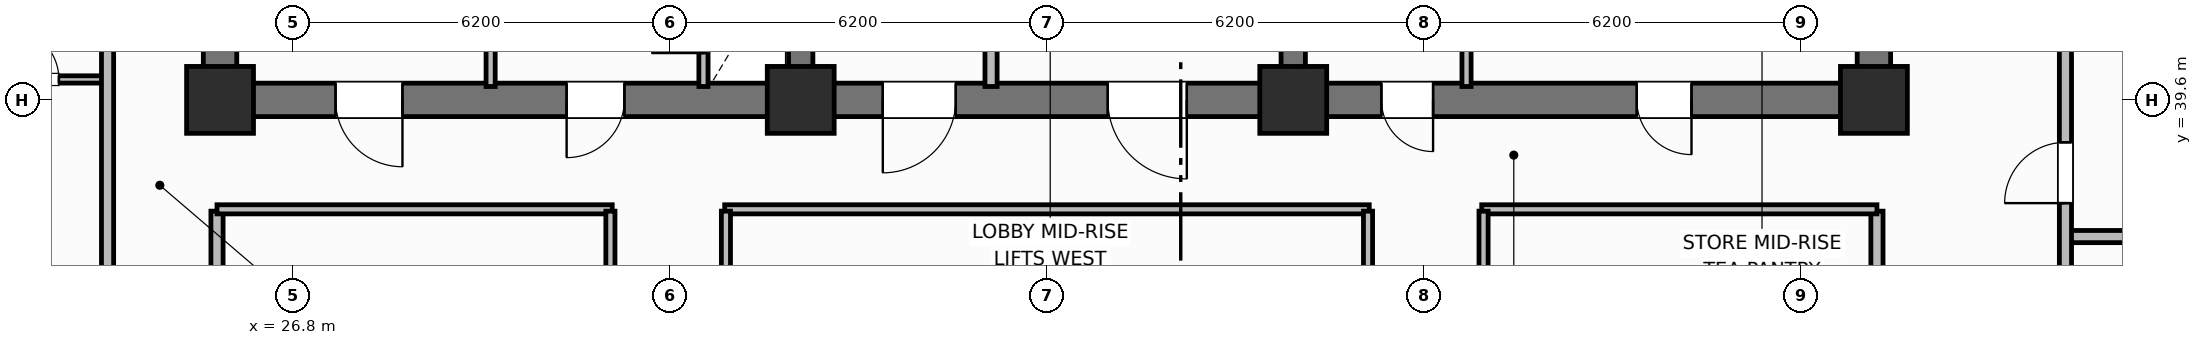
"""IFC4 building model, lengths in metres.
Left out: names, types, materials, properties, quantities, classifications, styles, units other than length and angle.
Written with IfcOpenShell. Run it as: python <this file> out.ifc"""

import sys

from ifc_helpers import new_model, si_unit, direction, frame, frame_2d, origin, origin_2d, place, context, subcontext, project, spatial, rectangle, extrude, element, fill, save


model = new_model("IFC4")
c1 = context("Model", 3, precision=1e-05, world=origin(), true_north=direction((0.0, 1.0)))
c2 = subcontext(c1, "Body", "Model", "MODEL_VIEW")
j1 = project(units=[si_unit("LENGTHUNIT", "METRE"), si_unit("PLANEANGLEUNIT", "RADIAN")], contexts=[c1])
p1 = place(None, origin())
s1 = spatial("IfcSite", under=j1, at=p1, CompositionType="ELEMENT")
p2 = place(p1, origin())
s2 = spatial("IfcBuilding", under=s1, at=p2, CompositionType="ELEMENT")
p3 = place(p2, frame((0.0, 0.0, 114.2)))
s3 = spatial("IfcBuildingStorey", under=s2, at=p3, CompositionType="ELEMENT", Elevation=114.2)
for number, where, z_axis, x_axis in (
    (1, (25.6, 39.875, 0.0), (0.0, 0.0, 1.0), (0.0, 1.0, 0.0)),
    (2, (52.8, 39.875, 0.0), (0.0, 0.0, 1.0), (0.0, 1.0, 0.0)),
):
    element("IfcWall", number, at=place(p3, frame(where, z_axis=z_axis, x_axis=x_axis)), inside=s3, PredefinedType="SHEAR", context=c2, shape_type="SweptSolid", body=[
        extrude(rectangle(XDim=5.65, YDim=0.55, at=frame_2d((2.825, 0.0))), origin(), (0.0, 0.0, 1.0), 3.7),
    ])
p4 = place(p3, frame((52.8, 39.6, 0.0), z_axis=(0.0, 0.0, 1.0), x_axis=(-1.0, 0.0, 0.0)))
e3 = element("IfcWall", 3, at=p4, inside=s3, PredefinedType="SHEAR", context=c2, shape_type="SweptSolid", body=[
    extrude(rectangle(XDim=27.2, YDim=0.55, at=frame_2d((13.6, 0.0))), origin(), (0.0, 0.0, 1.0), 3.7),
])
p5 = place(p4, frame((24.2, 0.0, 0.0)))
e4 = element("IfcOpeningElement", 4, at=p5, cuts=e3, PredefinedType="OPENING", context=c2, shape_type="SweptSolid", body=[
    extrude(rectangle(XDim=1.1, YDim=2.15, at=frame_2d((0.55, 1.075))), frame((0.0, 0.285, 0.0), z_axis=(0.0, -1.0, 0.0), x_axis=(1.0, 0.0, 0.0)), (0.0, 0.0, 1.0), 0.57),
])
p6 = place(p4, frame((20.55, 0.0, 0.0)))
e5 = element("IfcOpeningElement", 5, at=p6, cuts=e3, PredefinedType="OPENING", context=c2, shape_type="SweptSolid", body=[
    extrude(rectangle(XDim=0.95, YDim=2.1, at=frame_2d((0.475, 1.05))), frame((0.0, 0.285, 0.0), z_axis=(0.0, -1.0, 0.0), x_axis=(1.0, 0.0, 0.0)), (0.0, 0.0, 1.0), 0.57),
])
p7 = place(p4, frame((15.1, 0.0, 0.0)))
e6 = element("IfcOpeningElement", 6, at=p7, cuts=e3, PredefinedType="OPENING", context=c2, shape_type="SweptSolid", body=[
    extrude(rectangle(XDim=1.2, YDim=2.15, at=frame_2d((0.6, 1.075))), frame((0.0, 0.285, 0.0), z_axis=(0.0, -1.0, 0.0), x_axis=(1.0, 0.0, 0.0)), (0.0, 0.0, 1.0), 0.57),
])
p8 = place(p4, frame((11.3, 0.0, 0.0)))
e7 = element("IfcOpeningElement", 7, at=p8, cuts=e3, PredefinedType="OPENING", context=c2, shape_type="SweptSolid", body=[
    extrude(rectangle(XDim=1.3, YDim=2.2, at=frame_2d((0.65, 1.1))), frame((0.0, 0.285, 0.0), z_axis=(0.0, -1.0, 0.0), x_axis=(1.0, 0.0, 0.0)), (0.0, 0.0, 1.0), 0.57),
])
p9 = place(p4, frame((7.25, 0.0, 0.0)))
e8 = element("IfcOpeningElement", 8, at=p9, cuts=e3, PredefinedType="OPENING", context=c2, shape_type="SweptSolid", body=[
    extrude(rectangle(XDim=0.85, YDim=2.1, at=frame_2d((0.425, 1.05))), frame((0.0, 0.285, 0.0), z_axis=(0.0, -1.0, 0.0), x_axis=(1.0, 0.0, 0.0)), (0.0, 0.0, 1.0), 0.57),
])
p10 = place(p4, frame((3.0, 0.0, 0.0)))
e9 = element("IfcOpeningElement", 9, at=p10, cuts=e3, PredefinedType="OPENING", context=c2, shape_type="SweptSolid", body=[
    extrude(rectangle(XDim=0.9, YDim=2.1, at=frame_2d((0.45, 1.05))), frame((0.0, 0.285, 0.0), z_axis=(0.0, -1.0, 0.0), x_axis=(1.0, 0.0, 0.0)), (0.0, 0.0, 1.0), 0.57),
])
for number, where, z_axis, x_axis in (
    (10, (35.15, 39.875, 0.0), (0.0, 0.0, 1.0), (0.0, 1.0, 0.0)),
    (11, (43.25, 39.875, 0.0), (0.0, 0.0, 1.0), (0.0, 1.0, 0.0)),
):
    element("IfcWall", number, at=place(p3, frame(where, z_axis=z_axis, x_axis=x_axis)), inside=s3, PredefinedType="SHEAR", context=c2, shape_type="SweptSolid", body=[
        extrude(rectangle(XDim=5.65, YDim=0.4, at=frame_2d((2.825, 0.0))), origin(), (0.0, 0.0, 1.0), 3.7),
    ])
for number, where, z_axis, x_axis in (
    (12, (25.6, 39.6, 0.0), (0.0, 0.0, 1.0), (1.0, 0.0, 0.0)),
    (13, (35.15, 39.6, 0.0), (0.0, 0.0, 1.0), (1.0, 0.0, 0.0)),
    (14, (43.25, 39.6, 0.0), (0.0, 0.0, 1.0), (1.0, 0.0, 0.0)),
    (15, (52.8, 39.6, 0.0), (0.0, 0.0, 1.0), (1.0, 0.0, 0.0)),
):
    element("IfcColumn", number, at=place(p3, frame(where, z_axis=z_axis, x_axis=x_axis)), inside=s3, PredefinedType="COLUMN", context=c2, shape_type="SweptSolid", body=[
        extrude(rectangle(XDim=1.1, YDim=1.1, at=origin_2d()), origin(), (0.0, 0.0, 1.0), 3.7),
    ])
p11 = place(p3, frame((33.55, 39.82, 0.0), z_axis=(0.0, 0.0, 1.0), x_axis=(0.0, 1.0, 0.0)))
e16 = element("IfcWall", 16, at=p11, inside=s3, PredefinedType="PARTITIONING", context=c2, shape_type="SweptSolid", body=[
    extrude(rectangle(XDim=2.13, YDim=0.15, at=frame_2d((1.065, 0.0))), origin(), (0.0, 0.0, 1.0), 2.53),
])
p12 = place(p11, frame((0.55, 0.0, 0.0)))
e17 = element("IfcOpeningElement", 17, at=p12, cuts=e16, PredefinedType="OPENING", context=c2, shape_type="SweptSolid", body=[
    extrude(rectangle(XDim=0.85, YDim=2.05, at=frame_2d((0.425, 1.025))), frame((0.0, 0.085, 0.0), z_axis=(0.0, -1.0, 0.0), x_axis=(1.0, 0.0, 0.0)), (0.0, 0.0, 1.0), 0.17),
])
p13 = place(p3, frame((30.05, 39.82, 0.0), z_axis=(0.0, 0.0, 1.0), x_axis=(0.0, 1.0, 0.0)))
e18 = element("IfcWall", 18, at=p13, inside=s3, PredefinedType="PARTITIONING", context=c2, shape_type="SweptSolid", body=[
    extrude(rectangle(XDim=2.13, YDim=0.15, at=frame_2d((1.065, 0.0))), origin(), (0.0, 0.0, 1.0), 2.53),
])
p14 = place(p3, frame((38.28, 39.82, 0.0), z_axis=(0.0, 0.0, 1.0), x_axis=(0.0, 1.0, 0.0)))
e19 = element("IfcWall", 19, at=p14, inside=s3, PredefinedType="PARTITIONING", context=c2, shape_type="SweptSolid", body=[
    extrude(rectangle(XDim=2.73, YDim=0.2, at=frame_2d((1.365, 0.0))), origin(), (0.0, 0.0, 1.0), 2.53),
])
p15 = place(p3, frame((46.1, 39.82, 0.0), z_axis=(0.0, 0.0, 1.0), x_axis=(0.0, 1.0, 0.0)))
e20 = element("IfcWall", 20, at=p15, inside=s3, PredefinedType="PARTITIONING", context=c2, shape_type="SweptSolid", body=[
    extrude(rectangle(XDim=2.73, YDim=0.15, at=frame_2d((1.365, 0.0))), origin(), (0.0, 0.0, 1.0), 2.53),
])
for number, where, z_axis, x_axis in (
    (21, (25.55, 18.63, 0.0), (0.0, 0.0, 1.0), (0.0, 1.0, 0.0)),
    (22, (52.85, 18.63, 0.0), (0.0, 0.0, 1.0), (0.0, 1.0, 0.0)),
):
    element("IfcWall", number, at=place(p3, frame(where, z_axis=z_axis, x_axis=x_axis)), inside=s3, PredefinedType="PARTITIONING", context=c2, shape_type="SweptSolid", body=[
        extrude(rectangle(XDim=19.14, YDim=0.2, at=frame_2d((9.57, 0.0))), origin(), (0.0, 0.0, 1.0), 2.53),
    ])
p16 = place(p3, frame((25.55, 37.8, 0.0), z_axis=(0.0, 0.0, 1.0), x_axis=(1.0, 0.0, 0.0)))
e23 = element("IfcWall", 23, at=p16, inside=s3, PredefinedType="PARTITIONING", context=c2, shape_type="SweptSolid", body=[
    extrude(rectangle(XDim=6.5, YDim=0.15, at=frame_2d((3.25, 0.0))), origin(), (0.0, 0.0, 1.0), 2.53),
])
p17 = place(p3, frame((33.9, 37.8, 0.0), z_axis=(0.0, 0.0, 1.0), x_axis=(1.0, 0.0, 0.0)))
e24 = element("IfcWall", 24, at=p17, inside=s3, PredefinedType="PARTITIONING", context=c2, shape_type="SweptSolid", body=[
    extrude(rectangle(XDim=10.6, YDim=0.15, at=frame_2d((5.3, 0.0))), origin(), (0.0, 0.0, 1.0), 2.53),
])
p18 = place(p3, frame((46.35, 37.8, 0.0), z_axis=(0.0, 0.0, 1.0), x_axis=(1.0, 0.0, 0.0)))
e25 = element("IfcWall", 25, at=p18, inside=s3, PredefinedType="PARTITIONING", context=c2, shape_type="SweptSolid", body=[
    extrude(rectangle(XDim=6.5, YDim=0.15, at=frame_2d((3.25, 0.0))), origin(), (0.0, 0.0, 1.0), 2.53),
])
p19 = place(p3, frame((32.02, 18.63, 0.0), z_axis=(0.0, 0.0, 1.0), x_axis=(0.0, 1.0, 0.0)))
e26 = element("IfcWall", 26, at=p19, inside=s3, PredefinedType="PARTITIONING", context=c2, shape_type="SweptSolid", body=[
    extrude(rectangle(XDim=19.14, YDim=0.15, at=frame_2d((9.57, 0.0))), origin(), (0.0, 0.0, 1.0), 2.53),
])
p20 = place(p19, frame((5.5, 0.0, 0.0)))
e27 = element("IfcOpeningElement", 27, at=p20, cuts=e26, PredefinedType="OPENING", context=c2, shape_type="SweptSolid", body=[
    extrude(rectangle(XDim=1.0, YDim=2.15, at=frame_2d((0.5, 1.075))), frame((0.0, 0.085, 0.0), z_axis=(0.0, -1.0, 0.0), x_axis=(1.0, 0.0, 0.0)), (0.0, 0.0, 1.0), 0.17),
])
p21 = place(p3, frame((33.92, 18.63, 0.0), z_axis=(0.0, 0.0, 1.0), x_axis=(0.0, 1.0, 0.0)))
e28 = element("IfcWall", 28, at=p21, inside=s3, PredefinedType="PARTITIONING", context=c2, shape_type="SweptSolid", body=[
    extrude(rectangle(XDim=19.14, YDim=0.15, at=frame_2d((9.57, 0.0))), origin(), (0.0, 0.0, 1.0), 2.53),
])
p22 = place(p21, frame((2.4, 0.0, 0.0)))
e29 = element("IfcOpeningElement", 29, at=p22, cuts=e28, PredefinedType="OPENING", context=c2, shape_type="SweptSolid", body=[
    extrude(rectangle(XDim=1.0, YDim=2.15, at=frame_2d((0.5, 1.075))), frame((0.0, 0.085, 0.0), z_axis=(0.0, -1.0, 0.0), x_axis=(1.0, 0.0, 0.0)), (0.0, 0.0, 1.0), 0.17),
])
p23 = place(p3, frame((44.48, 18.63, 0.0), z_axis=(0.0, 0.0, 1.0), x_axis=(0.0, 1.0, 0.0)))
e30 = element("IfcWall", 30, at=p23, inside=s3, PredefinedType="PARTITIONING", context=c2, shape_type="SweptSolid", body=[
    extrude(rectangle(XDim=19.14, YDim=0.15, at=frame_2d((9.57, 0.0))), origin(), (0.0, 0.0, 1.0), 2.53),
])
p24 = place(p23, frame((10.804, 0.0, 0.0)))
e31 = element("IfcOpeningElement", 31, at=p24, cuts=e30, PredefinedType="OPENING", context=c2, shape_type="SweptSolid", body=[
    extrude(rectangle(XDim=1.0, YDim=2.15, at=frame_2d((0.5, 1.075))), frame((0.0, 0.085, 0.0), z_axis=(0.0, -1.0, 0.0), x_axis=(1.0, 0.0, 0.0)), (0.0, 0.0, 1.0), 0.17),
])
p25 = place(p3, frame((46.38, 18.63, 0.0), z_axis=(0.0, 0.0, 1.0), x_axis=(0.0, 1.0, 0.0)))
e32 = element("IfcWall", 32, at=p25, inside=s3, PredefinedType="PARTITIONING", context=c2, shape_type="SweptSolid", body=[
    extrude(rectangle(XDim=19.14, YDim=0.15, at=frame_2d((9.57, 0.0))), origin(), (0.0, 0.0, 1.0), 2.53),
])
p26 = place(p25, frame((5.5, 0.0, 0.0)))
e33 = element("IfcOpeningElement", 33, at=p26, cuts=e32, PredefinedType="OPENING", context=c2, shape_type="SweptSolid", body=[
    extrude(rectangle(XDim=1.0, YDim=2.15, at=frame_2d((0.5, 1.075))), frame((0.0, 0.085, 0.0), z_axis=(0.0, -1.0, 0.0), x_axis=(1.0, 0.0, 0.0)), (0.0, 0.0, 1.0), 0.17),
])
p27 = place(p3, frame((21.5, 39.936, 0.0), z_axis=(0.0, 0.0, 1.0), x_axis=(1.0, 0.0, 0.0)))
e34 = element("IfcWall", 34, at=p27, inside=s3, PredefinedType="PARTITIONING", context=c2, shape_type="SweptSolid", body=[
    extrude(rectangle(XDim=2.25, YDim=0.12, at=frame_2d((1.125, 0.0))), origin(), (0.0, 0.0, 1.0), 2.53),
])
p28 = place(p27, frame((0.6, 0.0, 0.0)))
e35 = element("IfcOpeningElement", 35, at=p28, cuts=e34, PredefinedType="OPENING", context=c2, shape_type="SweptSolid", body=[
    extrude(rectangle(XDim=0.85, YDim=2.1, at=frame_2d((0.425, 1.05))), frame((0.0, 0.07, 0.0), z_axis=(0.0, -1.0, 0.0), x_axis=(1.0, 0.0, 0.0)), (0.0, 0.0, 1.0), 0.14),
])
p29 = place(p3, frame((23.75, 10.6, 0.0), z_axis=(0.0, 0.0, 1.0), x_axis=(0.0, 1.0, 0.0)))
e36 = element("IfcWall", 36, at=p29, inside=s3, PredefinedType="PARTITIONING", context=c2, shape_type="SweptSolid", body=[
    extrude(rectangle(XDim=35.2, YDim=0.2, at=frame_2d((17.6, 0.0))), origin(), (0.0, 0.0, 1.0), 2.53),
])
p30 = place(p29, frame((2.65, 0.0, 0.0)))
e37 = element("IfcOpeningElement", 37, at=p30, cuts=e36, PredefinedType="OPENING", context=c2, shape_type="SweptSolid", body=[
    extrude(rectangle(XDim=1.0, YDim=2.15, at=frame_2d((0.5, 1.075))), frame((0.0, 0.11, 0.0), z_axis=(0.0, -1.0, 0.0), x_axis=(1.0, 0.0, 0.0)), (0.0, 0.0, 1.0), 0.22),
])
p31 = place(p29, frame((12.87, 0.0, 0.0)))
e38 = element("IfcOpeningElement", 38, at=p31, cuts=e36, PredefinedType="OPENING", context=c2, shape_type="SweptSolid", body=[
    extrude(rectangle(XDim=1.0, YDim=2.15, at=frame_2d((0.5, 1.075))), frame((0.0, 0.11, 0.0), z_axis=(0.0, -1.0, 0.0), x_axis=(1.0, 0.0, 0.0)), (0.0, 0.0, 1.0), 0.22),
])
p32 = place(p29, frame((24.486, 0.0, 0.0)))
e39 = element("IfcOpeningElement", 39, at=p32, cuts=e36, PredefinedType="OPENING", context=c2, shape_type="SweptSolid", body=[
    extrude(rectangle(XDim=1.0, YDim=2.15, at=frame_2d((0.5, 1.075))), frame((0.0, 0.11, 0.0), z_axis=(0.0, -1.0, 0.0), x_axis=(1.0, 0.0, 0.0)), (0.0, 0.0, 1.0), 0.22),
])
p33 = place(p3, frame((55.95, 37.352, 0.0), z_axis=(0.0, 0.0, 1.0), x_axis=(1.0, 0.0, 0.0)))
e40 = element("IfcWall", 40, at=p33, inside=s3, PredefinedType="PARTITIONING", context=c2, shape_type="SweptSolid", body=[
    extrude(rectangle(XDim=7.88, YDim=0.2, at=frame_2d((3.94, 0.0))), origin(), (0.0, 0.0, 1.0), 2.53),
])
p34 = place(p3, frame((55.95, 10.6, 0.0), z_axis=(0.0, 0.0, 1.0), x_axis=(0.0, 1.0, 0.0)))
e41 = element("IfcWall", 41, at=p34, inside=s3, PredefinedType="PARTITIONING", context=c2, shape_type="SweptSolid", body=[
    extrude(rectangle(XDim=35.2, YDim=0.2, at=frame_2d((17.6, 0.0))), origin(), (0.0, 0.0, 1.0), 2.53),
])
p35 = place(p34, frame((2.65, 0.0, 0.0)))
e42 = element("IfcOpeningElement", 42, at=p35, cuts=e41, PredefinedType="OPENING", context=c2, shape_type="SweptSolid", body=[
    extrude(rectangle(XDim=1.0, YDim=2.15, at=frame_2d((0.5, 1.075))), frame((0.0, 0.11, 0.0), z_axis=(0.0, -1.0, 0.0), x_axis=(1.0, 0.0, 0.0)), (0.0, 0.0, 1.0), 0.22),
])
p36 = place(p34, frame((11.352, 0.0, 0.0)))
e43 = element("IfcOpeningElement", 43, at=p36, cuts=e41, PredefinedType="OPENING", context=c2, shape_type="SweptSolid", body=[
    extrude(rectangle(XDim=1.0, YDim=2.15, at=frame_2d((0.5, 1.075))), frame((0.0, 0.11, 0.0), z_axis=(0.0, -1.0, 0.0), x_axis=(1.0, 0.0, 0.0)), (0.0, 0.0, 1.0), 0.22),
])
p37 = place(p34, frame((21.37, 0.0, 0.0)))
e44 = element("IfcOpeningElement", 44, at=p37, cuts=e41, PredefinedType="OPENING", context=c2, shape_type="SweptSolid", body=[
    extrude(rectangle(XDim=1.0, YDim=2.15, at=frame_2d((0.5, 1.075))), frame((0.0, 0.11, 0.0), z_axis=(0.0, -1.0, 0.0), x_axis=(1.0, 0.0, 0.0)), (0.0, 0.0, 1.0), 0.22),
])
p38 = place(p34, frame((27.302, 0.0, 0.0)))
e45 = element("IfcOpeningElement", 45, at=p38, cuts=e41, PredefinedType="OPENING", context=c2, shape_type="SweptSolid", body=[
    extrude(rectangle(XDim=1.0, YDim=2.15, at=frame_2d((0.5, 1.075))), frame((0.0, 0.11, 0.0), z_axis=(0.0, -1.0, 0.0), x_axis=(1.0, 0.0, 0.0)), (0.0, 0.0, 1.0), 0.22),
])
p39 = place(p12, origin())
e46 = element("IfcDoor", 46, at=p39, inside=s3, OperationType="SINGLE_SWING_LEFT", PredefinedType="TRAPDOOR", context=c2, shape_type="SweptSolid", body=[
    extrude(rectangle(XDim=0.85, YDim=2.05, at=frame_2d((0.425, 1.025))), frame((0.0, 0.025, 0.0), z_axis=(0.0, -1.0, 0.0), x_axis=(1.0, 0.0, 0.0)), (0.0, 0.0, 1.0), 0.05),
])
fill(e17, e46)
p40 = place(p28, origin())
e47 = element("IfcDoor", 47, at=p40, inside=s3, OperationType="SINGLE_SWING_LEFT", PredefinedType="DOOR", context=c2, shape_type="SweptSolid", body=[
    extrude(rectangle(XDim=0.85, YDim=2.1, at=frame_2d((0.425, 1.05))), frame((0.0, 0.025, 0.0), z_axis=(0.0, -1.0, 0.0), x_axis=(1.0, 0.0, 0.0)), (0.0, 0.0, 1.0), 0.05),
])
fill(e35, e47)
p41 = place(p38, origin())
e48 = element("IfcDoor", 48, at=p41, inside=s3, OperationType="SINGLE_SWING_LEFT", PredefinedType="DOOR", context=c2, shape_type="SweptSolid", body=[
    extrude(rectangle(XDim=1.0, YDim=2.15, at=frame_2d((0.5, 1.075))), frame((0.0, 0.025, 0.0), z_axis=(0.0, -1.0, 0.0), x_axis=(1.0, 0.0, 0.0)), (0.0, 0.0, 1.0), 0.05),
])
fill(e45, e48)
p42 = place(p5, origin())
e49 = element("IfcDoor", 49, at=p42, inside=s3, OperationType="SINGLE_SWING_LEFT", PredefinedType="DOOR", context=c2, shape_type="SweptSolid", body=[
    extrude(rectangle(XDim=1.1, YDim=2.15, at=frame_2d((0.55, 1.075))), frame((0.0, 0.025, 0.0), z_axis=(0.0, -1.0, 0.0), x_axis=(1.0, 0.0, 0.0)), (0.0, 0.0, 1.0), 0.05),
])
fill(e4, e49)
p43 = place(p6, origin())
e50 = element("IfcDoor", 50, at=p43, inside=s3, OperationType="SINGLE_SWING_RIGHT", PredefinedType="DOOR", context=c2, shape_type="SweptSolid", body=[
    extrude(rectangle(XDim=0.95, YDim=2.1, at=frame_2d((0.475, 1.05))), frame((0.0, 0.025, 0.0), z_axis=(0.0, -1.0, 0.0), x_axis=(1.0, 0.0, 0.0)), (0.0, 0.0, 1.0), 0.05),
])
fill(e5, e50)
p44 = place(p7, origin())
e51 = element("IfcDoor", 51, at=p44, inside=s3, OperationType="SINGLE_SWING_RIGHT", PredefinedType="DOOR", context=c2, shape_type="SweptSolid", body=[
    extrude(rectangle(XDim=1.2, YDim=2.15, at=frame_2d((0.6, 1.075))), frame((0.0, 0.025, 0.0), z_axis=(0.0, -1.0, 0.0), x_axis=(1.0, 0.0, 0.0)), (0.0, 0.0, 1.0), 0.05),
])
fill(e6, e51)
p45 = place(p8, origin())
e52 = element("IfcDoor", 52, at=p45, inside=s3, OperationType="SINGLE_SWING_LEFT", PredefinedType="DOOR", context=c2, shape_type="SweptSolid", body=[
    extrude(rectangle(XDim=1.3, YDim=2.2, at=frame_2d((0.65, 1.1))), frame((0.0, 0.025, 0.0), z_axis=(0.0, -1.0, 0.0), x_axis=(1.0, 0.0, 0.0)), (0.0, 0.0, 1.0), 0.05),
])
fill(e7, e52)
p46 = place(p9, origin())
e53 = element("IfcDoor", 53, at=p46, inside=s3, OperationType="SINGLE_SWING_LEFT", PredefinedType="DOOR", context=c2, shape_type="SweptSolid", body=[
    extrude(rectangle(XDim=0.85, YDim=2.1, at=frame_2d((0.425, 1.05))), frame((0.0, 0.025, 0.0), z_axis=(0.0, -1.0, 0.0), x_axis=(1.0, 0.0, 0.0)), (0.0, 0.0, 1.0), 0.05),
])
fill(e8, e53)
p47 = place(p10, origin())
e54 = element("IfcDoor", 54, at=p47, inside=s3, OperationType="SINGLE_SWING_LEFT", PredefinedType="DOOR", context=c2, shape_type="SweptSolid", body=[
    extrude(rectangle(XDim=0.9, YDim=2.1, at=frame_2d((0.45, 1.05))), frame((0.0, 0.025, 0.0), z_axis=(0.0, -1.0, 0.0), x_axis=(1.0, 0.0, 0.0)), (0.0, 0.0, 1.0), 0.05),
])
fill(e9, e54)
save(model, sys.argv[1])
